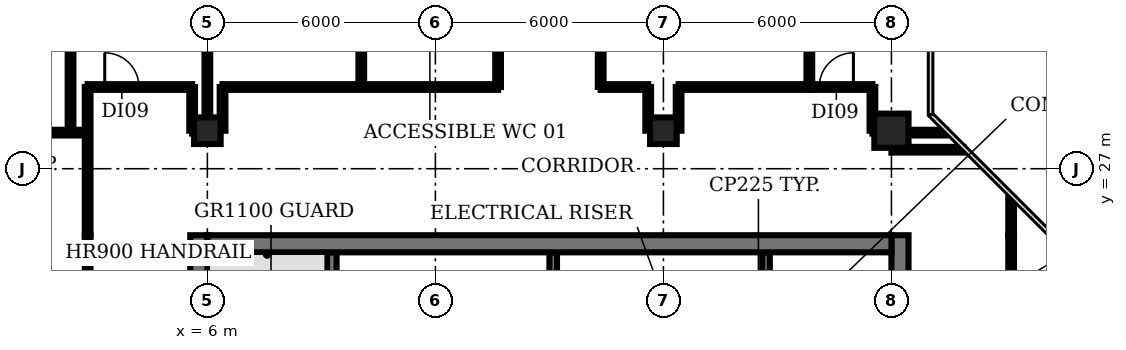
"""IFC4 building model, lengths in metres.
Left out: names, types, materials, properties, quantities, classifications, styles, units other than length and angle.
Written with IfcOpenShell. Run it as: python <this file> out.ifc"""

import sys

from ifc_helpers import new_model, si_unit, direction, frame, frame_2d, origin, origin_2d, place, context, subcontext, project, spatial, rectangle, circle, extrude, element, fill, save


model = new_model("IFC4")
c1 = context("Model", 3, precision=1e-05, world=origin(), true_north=direction((0.0, 1.0)))
c2 = subcontext(c1, "Body", "Model", "MODEL_VIEW")
j1 = project(units=[si_unit("LENGTHUNIT", "METRE"), si_unit("PLANEANGLEUNIT", "RADIAN")], contexts=[c1])
p1 = place(None, origin())
s1 = spatial("IfcSite", under=j1, at=p1, CompositionType="ELEMENT")
p2 = place(p1, origin())
s2 = spatial("IfcBuilding", under=s1, at=p2, CompositionType="ELEMENT")
p3 = place(p2, frame((0.0, 0.0, 243.2)))
s3 = spatial("IfcBuildingStorey", under=s2, at=p3, CompositionType="ELEMENT", Elevation=243.2)
for number, where, z_axis, x_axis in (
    (1, (6.0, 28.0, 0.0), (0.0, 0.0, 1.0), (1.0, 0.0, 0.0)),
    (2, (18.0, 28.0, 0.0), (0.0, 0.0, 1.0), (1.0, 0.0, 0.0)),
):
    element("IfcColumn", number, at=place(p3, frame(where, z_axis=z_axis, x_axis=x_axis)), inside=s3, PredefinedType="COLUMN", context=c2, shape_type="SweptSolid", body=[
        extrude(rectangle(XDim=0.7, YDim=0.7, at=origin_2d()), origin(), (0.0, 0.0, 1.0), 3.85),
    ])
p4 = place(p3, frame((24.0, 28.0, 0.0), z_axis=(0.0, 0.0, 1.0), x_axis=(1.0, 0.0, 0.0)))
e3 = element("IfcColumn", 3, at=p4, inside=s3, PredefinedType="COLUMN", context=c2, shape_type="SweptSolid", body=[
    extrude(circle(Radius=0.45, at=origin_2d()), origin(), (0.0, 0.0, 1.0), 3.85),
])
p5 = place(p3, frame((9.275, 18.375, 0.0), z_axis=(0.0, 0.0, 1.0), x_axis=(0.0, 1.0, 0.0)))
e4 = element("IfcWall", 4, at=p5, inside=s3, PredefinedType="SHEAR", context=c2, shape_type="SweptSolid", body=[
    extrude(rectangle(XDim=6.425, YDim=0.25, at=frame_2d((3.212, 0.0))), origin(), (0.0, 0.0, 1.0), 3.85),
])
for number, where, z_axis, x_axis in (
    (5, (15.1, 22.9, 0.0), (0.0, 0.0, 1.0), (0.0, 1.0, 0.0)),
    (6, (20.7, 22.9, 0.0), (0.0, 0.0, 1.0), (0.0, 1.0, 0.0)),
):
    element("IfcWall", number, at=place(p3, frame(where, z_axis=z_axis, x_axis=x_axis)), inside=s3, PredefinedType="SHEAR", context=c2, shape_type="SweptSolid", body=[
        extrude(rectangle(XDim=1.9, YDim=0.2, at=frame_2d((0.95, 0.0))), origin(), (0.0, 0.0, 1.0), 3.85),
    ])
p6 = place(p3, frame((5.775, 4.42, 0.0), z_axis=(0.0, 0.0, 1.0), x_axis=(0.0, 1.0, 0.0)))
e7 = element("IfcWall", 7, at=p6, inside=s3, PredefinedType="SHEAR", context=c2, shape_type="SweptSolid", body=[
    extrude(rectangle(XDim=20.83, YDim=0.45, at=frame_2d((10.415, 0.0))), origin(), (0.0, 0.0, 1.0), 3.85),
])
p7 = place(p6, frame((1.23, 0.0, 0.0)))
e8 = element("IfcOpeningElement", 8, at=p7, cuts=e7, PredefinedType="OPENING", context=c2, shape_type="SweptSolid", body=[
    extrude(rectangle(XDim=1.5, YDim=2.1, at=frame_2d((0.75, 1.05))), frame((0.0, 0.235, 0.0), z_axis=(0.0, -1.0, 0.0), x_axis=(1.0, 0.0, 0.0)), (0.0, 0.0, 1.0), 0.47),
])
p8 = place(p6, frame((7.68, 0.0, 0.0)))
e9 = element("IfcOpeningElement", 9, at=p8, cuts=e7, PredefinedType="OPENING", context=c2, shape_type="SweptSolid", body=[
    extrude(rectangle(XDim=1.2, YDim=2.1, at=frame_2d((0.6, 1.05))), frame((0.0, 0.235, 0.0), z_axis=(0.0, -1.0, 0.0), x_axis=(1.0, 0.0, 0.0)), (0.0, 0.0, 1.0), 0.47),
])
p9 = place(p6, frame((14.23, 0.0, 0.0)))
e10 = element("IfcOpeningElement", 10, at=p9, cuts=e7, PredefinedType="OPENING", context=c2, shape_type="SweptSolid", body=[
    extrude(rectangle(XDim=1.2, YDim=2.1, at=frame_2d((0.6, 1.05))), frame((0.0, 0.235, 0.0), z_axis=(0.0, -1.0, 0.0), x_axis=(1.0, 0.0, 0.0)), (0.0, 0.0, 1.0), 0.47),
])
p10 = place(p3, frame((24.225, 25.25, 0.0), z_axis=(0.0, 0.0, 1.0), x_axis=(0.0, -1.0, 0.0)))
e11 = element("IfcWall", 11, at=p10, inside=s3, PredefinedType="SHEAR", context=c2, shape_type="SweptSolid", body=[
    extrude(rectangle(XDim=20.83, YDim=0.45, at=frame_2d((10.415, 0.0))), origin(), (0.0, 0.0, 1.0), 3.85),
])
p11 = place(p10, frame((18.1, 0.0, 0.0)))
e12 = element("IfcOpeningElement", 12, at=p11, cuts=e11, PredefinedType="OPENING", context=c2, shape_type="SweptSolid", body=[
    extrude(rectangle(XDim=1.5, YDim=2.1, at=frame_2d((0.75, 1.05))), frame((0.0, 0.235, 0.0), z_axis=(0.0, -1.0, 0.0), x_axis=(1.0, 0.0, 0.0)), (0.0, 0.0, 1.0), 0.47),
])
p12 = place(p10, frame((12.0, 0.0, 0.0)))
e13 = element("IfcOpeningElement", 13, at=p12, cuts=e11, PredefinedType="OPENING", context=c2, shape_type="SweptSolid", body=[
    extrude(rectangle(XDim=0.9, YDim=2.1, at=frame_2d((0.45, 1.05))), frame((0.0, 0.235, 0.0), z_axis=(0.0, -1.0, 0.0), x_axis=(1.0, 0.0, 0.0)), (0.0, 0.0, 1.0), 0.47),
])
p13 = place(p10, frame((6.0, 0.0, 0.0)))
e14 = element("IfcOpeningElement", 14, at=p13, cuts=e11, PredefinedType="OPENING", context=c2, shape_type="SweptSolid", body=[
    extrude(rectangle(XDim=2.0, YDim=2.1, at=frame_2d((1.0, 1.05))), frame((0.0, 0.235, 0.0), z_axis=(0.0, -1.0, 0.0), x_axis=(1.0, 0.0, 0.0)), (0.0, 0.0, 1.0), 0.47),
])
p14 = place(p3, frame((6.0, 25.025, 0.0), z_axis=(0.0, 0.0, 1.0), x_axis=(1.0, 0.0, 0.0)))
e15 = element("IfcWall", 15, at=p14, inside=s3, PredefinedType="SHEAR", context=c2, shape_type="SweptSolid", body=[
    extrude(rectangle(XDim=18.0, YDim=0.45, at=frame_2d((9.0, 0.0))), origin(), (0.0, 0.0, 1.0), 3.85),
])
p15 = place(p3, frame((-1.52, 27.95, 0.0), z_axis=(0.0, 0.0, 1.0), x_axis=(1.0, 0.0, 0.0)))
e16 = element("IfcWall", 16, at=p15, inside=s3, PredefinedType="PARTITIONING", context=c2, shape_type="SweptSolid", body=[
    extrude(rectangle(XDim=4.37, YDim=0.15, at=frame_2d((2.185, 0.0))), origin(), (0.0, 0.0, 1.0), 2.88),
])
p16 = place(p3, frame((2.4, 27.95, 0.0), z_axis=(0.0, 0.0, 1.0), x_axis=(0.0, 1.0, 0.0)))
e17 = element("IfcWall", 17, at=p16, inside=s3, PredefinedType="PARTITIONING", context=c2, shape_type="SweptSolid", body=[
    extrude(rectangle(XDim=6.0, YDim=0.15, at=frame_2d((3.0, 0.0))), origin(), (0.0, 0.0, 1.0), 2.88),
])
p17 = place(p3, frame((2.85, 4.41, 0.0), z_axis=(0.0, 0.0, 1.0), x_axis=(0.0, 1.0, 0.0)))
e18 = element("IfcWall", 18, at=p17, inside=s3, PredefinedType="PARTITIONING", context=c2, shape_type="SweptSolid", body=[
    extrude(rectangle(XDim=20.84, YDim=0.15, at=frame_2d((10.42, 0.0))), origin(), (0.0, 0.0, 1.0), 2.88),
])
p18 = place(p17, frame((9.84, 0.0, 0.0)))
e19 = element("IfcOpeningElement", 19, at=p18, cuts=e18, PredefinedType="OPENING", context=c2, shape_type="SweptSolid", body=[
    extrude(rectangle(XDim=1.2, YDim=2.1, at=frame_2d((0.6, 1.05))), frame((0.0, 0.085, 0.0), z_axis=(0.0, -1.0, 0.0), x_axis=(1.0, 0.0, 0.0)), (0.0, 0.0, 1.0), 0.17),
])
p19 = place(p3, frame((2.85, 25.25, 0.0), z_axis=(0.0, 0.0, 1.0), x_axis=(0.0, 1.0, 0.0)))
e20 = element("IfcWall", 20, at=p19, inside=s3, PredefinedType="PARTITIONING", context=c2, shape_type="SweptSolid", body=[
    extrude(rectangle(XDim=3.9, YDim=0.15, at=frame_2d((1.95, 0.0))), origin(), (0.0, 0.0, 1.0), 2.88),
])
p20 = place(p3, frame((2.85, 29.15, 0.0), z_axis=(0.0, 0.0, 1.0), x_axis=(1.0, 0.0, 0.0)))
e21 = element("IfcWall", 21, at=p20, inside=s3, PredefinedType="PARTITIONING", context=c2, shape_type="SweptSolid", body=[
    extrude(rectangle(XDim=2.75, YDim=0.15, at=frame_2d((1.375, 0.0))), origin(), (0.0, 0.0, 1.0), 2.88),
])
p21 = place(p20, frame((0.45, 0.0, 0.0)))
e22 = element("IfcOpeningElement", 22, at=p21, cuts=e21, PredefinedType="OPENING", context=c2, shape_type="SweptSolid", body=[
    extrude(rectangle(XDim=0.9, YDim=2.1, at=frame_2d((0.45, 1.05))), frame((0.0, 0.085, 0.0), z_axis=(0.0, -1.0, 0.0), x_axis=(1.0, 0.0, 0.0)), (0.0, 0.0, 1.0), 0.17),
])
p22 = place(p3, frame((5.6, 28.0, 0.0), z_axis=(0.0, 0.0, 1.0), x_axis=(0.0, 1.0, 0.0)))
e23 = element("IfcWall", 23, at=p22, inside=s3, PredefinedType="PARTITIONING", context=c2, shape_type="SweptSolid", body=[
    extrude(rectangle(XDim=1.15, YDim=0.15, at=frame_2d((0.575, 0.0))), origin(), (0.0, 0.0, 1.0), 2.88),
])
p23 = place(p3, frame((5.6, 28.0, 0.0), z_axis=(0.0, 0.0, 1.0), x_axis=(1.0, 0.0, 0.0)))
e24 = element("IfcWall", 24, at=p23, inside=s3, PredefinedType="PARTITIONING", context=c2, shape_type="SweptSolid", body=[
    extrude(rectangle(XDim=0.4, YDim=0.15, at=frame_2d((0.2, 0.0))), origin(), (0.0, 0.0, 1.0), 2.88),
])
p24 = place(p3, frame((6.0, 28.0, 0.0), z_axis=(0.0, 0.0, 1.0), x_axis=(0.0, 1.0, 0.0)))
e25 = element("IfcWall", 25, at=p24, inside=s3, PredefinedType="PARTITIONING", context=c2, shape_type="SweptSolid", body=[
    extrude(rectangle(XDim=5.95, YDim=0.15, at=frame_2d((2.975, 0.0))), origin(), (0.0, 0.0, 1.0), 2.88),
])
p25 = place(p3, frame((6.4, 28.0, 0.0), z_axis=(0.0, 0.0, 1.0), x_axis=(0.0, 1.0, 0.0)))
e26 = element("IfcWall", 26, at=p25, inside=s3, PredefinedType="PARTITIONING", context=c2, shape_type="SweptSolid", body=[
    extrude(rectangle(XDim=1.15, YDim=0.15, at=frame_2d((0.575, 0.0))), origin(), (0.0, 0.0, 1.0), 2.88),
])
p26 = place(p3, frame((6.4, 29.15, 0.0), z_axis=(0.0, 0.0, 1.0), x_axis=(1.0, 0.0, 0.0)))
e27 = element("IfcWall", 27, at=p26, inside=s3, PredefinedType="PARTITIONING", context=c2, shape_type="SweptSolid", body=[
    extrude(rectangle(XDim=7.25, YDim=0.15, at=frame_2d((3.625, 0.0))), origin(), (0.0, 0.0, 1.0), 2.88),
])
p27 = place(p3, frame((10.05, 29.15, 0.0), z_axis=(0.0, 0.0, 1.0), x_axis=(0.0, 1.0, 0.0)))
e28 = element("IfcWall", 28, at=p27, inside=s3, PredefinedType="PARTITIONING", context=c2, shape_type="SweptSolid", body=[
    extrude(rectangle(XDim=4.8, YDim=0.15, at=frame_2d((2.4, 0.0))), origin(), (0.0, 0.0, 1.0), 2.88),
])
p28 = place(p3, frame((13.65, 29.15, 0.0), z_axis=(0.0, 0.0, 1.0), x_axis=(0.0, 1.0, 0.0)))
e29 = element("IfcWall", 29, at=p28, inside=s3, PredefinedType="PARTITIONING", context=c2, shape_type="SweptSolid", body=[
    extrude(rectangle(XDim=4.8, YDim=0.15, at=frame_2d((2.4, 0.0))), origin(), (0.0, 0.0, 1.0), 2.88),
])
p29 = place(p28, frame((1.6, 0.0, 0.0)))
e30 = element("IfcOpeningElement", 30, at=p29, cuts=e29, PredefinedType="OPENING", context=c2, shape_type="SweptSolid", body=[
    extrude(rectangle(XDim=0.9, YDim=2.1, at=frame_2d((0.45, 1.05))), frame((0.0, 0.085, 0.0), z_axis=(0.0, -1.0, 0.0), x_axis=(1.0, 0.0, 0.0)), (0.0, 0.0, 1.0), 0.17),
])
p30 = place(p3, frame((16.35, 29.15, 0.0), z_axis=(0.0, 0.0, 1.0), x_axis=(0.0, 1.0, 0.0)))
e31 = element("IfcWall", 31, at=p30, inside=s3, PredefinedType="PARTITIONING", context=c2, shape_type="SweptSolid", body=[
    extrude(rectangle(XDim=4.8, YDim=0.15, at=frame_2d((2.4, 0.0))), origin(), (0.0, 0.0, 1.0), 2.88),
])
p31 = place(p3, frame((16.35, 29.15, 0.0), z_axis=(0.0, 0.0, 1.0), x_axis=(1.0, 0.0, 0.0)))
e32 = element("IfcWall", 32, at=p31, inside=s3, PredefinedType="PARTITIONING", context=c2, shape_type="SweptSolid", body=[
    extrude(rectangle(XDim=1.25, YDim=0.15, at=frame_2d((0.625, 0.0))), origin(), (0.0, 0.0, 1.0), 2.88),
])
for number, where, z_axis, x_axis in (
    (33, (17.6, 28.0, 0.0), (0.0, 0.0, 1.0), (0.0, 1.0, 0.0)),
    (34, (18.4, 28.0, 0.0), (0.0, 0.0, 1.0), (0.0, 1.0, 0.0)),
):
    element("IfcWall", number, at=place(p3, frame(where, z_axis=z_axis, x_axis=x_axis)), inside=s3, PredefinedType="PARTITIONING", context=c2, shape_type="SweptSolid", body=[
        extrude(rectangle(XDim=1.15, YDim=0.15, at=frame_2d((0.575, 0.0))), origin(), (0.0, 0.0, 1.0), 2.88),
    ])
p32 = place(p3, frame((18.4, 29.15, 0.0), z_axis=(0.0, 0.0, 1.0), x_axis=(1.0, 0.0, 0.0)))
e35 = element("IfcWall", 35, at=p32, inside=s3, PredefinedType="PARTITIONING", context=c2, shape_type="SweptSolid", body=[
    extrude(rectangle(XDim=3.44, YDim=0.15, at=frame_2d((1.72, 0.0))), origin(), (0.0, 0.0, 1.0), 2.88),
])
p33 = place(p3, frame((21.84, 29.15, 0.0), z_axis=(0.0, 0.0, 1.0), x_axis=(0.0, 1.0, 0.0)))
e36 = element("IfcWall", 36, at=p33, inside=s3, PredefinedType="PARTITIONING", context=c2, shape_type="SweptSolid", body=[
    extrude(rectangle(XDim=4.8, YDim=0.15, at=frame_2d((2.4, 0.0))), origin(), (0.0, 0.0, 1.0), 2.88),
])
p34 = place(p3, frame((21.84, 29.15, 0.0), z_axis=(0.0, 0.0, 1.0), x_axis=(1.0, 0.0, 0.0)))
e37 = element("IfcWall", 37, at=p34, inside=s3, PredefinedType="PARTITIONING", context=c2, shape_type="SweptSolid", body=[
    extrude(rectangle(XDim=1.66, YDim=0.15, at=frame_2d((0.83, 0.0))), origin(), (0.0, 0.0, 1.0), 2.88),
])
p35 = place(p34, frame((0.26, 0.0, 0.0)))
e38 = element("IfcOpeningElement", 38, at=p35, cuts=e37, PredefinedType="OPENING", context=c2, shape_type="SweptSolid", body=[
    extrude(rectangle(XDim=0.9, YDim=2.1, at=frame_2d((0.45, 1.05))), frame((0.0, 0.085, 0.0), z_axis=(0.0, -1.0, 0.0), x_axis=(1.0, 0.0, 0.0)), (0.0, 0.0, 1.0), 0.17),
])
p36 = place(p3, frame((23.5, 28.0, 0.0), z_axis=(0.0, 0.0, 1.0), x_axis=(0.0, 1.0, 0.0)))
e39 = element("IfcWall", 39, at=p36, inside=s3, PredefinedType="PARTITIONING", context=c2, shape_type="SweptSolid", body=[
    extrude(rectangle(XDim=1.15, YDim=0.15, at=frame_2d((0.575, 0.0))), origin(), (0.0, 0.0, 1.0), 2.88),
])
p37 = place(p3, frame((23.5, 28.0, 0.0), z_axis=(0.0, 0.0, 1.0), x_axis=(1.0, 0.0, 0.0)))
e40 = element("IfcWall", 40, at=p37, inside=s3, PredefinedType="PARTITIONING", context=c2, shape_type="SweptSolid", body=[
    extrude(rectangle(XDim=0.5, YDim=0.15, at=frame_2d((0.25, 0.0))), origin(), (0.0, 0.0, 1.0), 2.88),
])
p38 = place(p3, frame((24.0, 27.5, 0.0), z_axis=(0.0, 0.0, 1.0), x_axis=(1.0, 0.0, 0.0)))
e41 = element("IfcWall", 41, at=p38, inside=s3, PredefinedType="PARTITIONING", context=c2, shape_type="SweptSolid", body=[
    extrude(rectangle(XDim=1.89, YDim=0.15, at=frame_2d((0.945, 0.0))), origin(), (0.0, 0.0, 1.0), 2.88),
])
p39 = place(p3, frame((24.0, 27.95, 0.0), z_axis=(0.0, 0.0, 1.0), x_axis=(1.0, 0.0, 0.0)))
e42 = element("IfcWall", 42, at=p39, inside=s3, PredefinedType="PARTITIONING", context=c2, shape_type="SweptSolid", body=[
    extrude(rectangle(XDim=1.44, YDim=0.15, at=frame_2d((0.72, 0.0))), origin(), (0.0, 0.0, 1.0), 2.88),
])
p40 = place(p3, frame((27.15, 20.4, 0.0), z_axis=(0.0, 0.0, 1.0), x_axis=(0.0, 1.0, 0.0)))
e43 = element("IfcWall", 43, at=p40, inside=s3, PredefinedType="PARTITIONING", context=c2, shape_type="SweptSolid", body=[
    extrude(rectangle(XDim=4.85, YDim=0.15, at=frame_2d((2.425, 0.0))), origin(), (0.0, 0.0, 1.0), 2.88),
])
p41 = place(p40, frame((1.7, 0.0, 0.0)))
e44 = element("IfcOpeningElement", 44, at=p41, cuts=e43, PredefinedType="OPENING", context=c2, shape_type="SweptSolid", body=[
    extrude(rectangle(XDim=1.8, YDim=2.1, at=frame_2d((0.9, 1.05))), frame((0.0, 0.085, 0.0), z_axis=(0.0, -1.0, 0.0), x_axis=(1.0, 0.0, 0.0)), (0.0, 0.0, 1.0), 0.17),
])
p42 = place(p3, frame((27.15, 25.25, 0.0), z_axis=(0.0, 0.0, 1.0), x_axis=(0.0, 1.0, 0.0)))
e45 = element("IfcWall", 45, at=p42, inside=s3, PredefinedType="PARTITIONING", context=c2, shape_type="SweptSolid", body=[
    extrude(rectangle(XDim=0.98, YDim=0.15, at=frame_2d((0.49, 0.0))), origin(), (0.0, 0.0, 1.0), 2.88),
])
p43 = place(p21, origin())
e46 = element("IfcDoor", 46, at=p43, inside=s3, OperationType="SINGLE_SWING_LEFT", PredefinedType="DOOR", context=c2, shape_type="SweptSolid", body=[
    extrude(rectangle(XDim=0.9, YDim=2.1, at=frame_2d((0.45, 1.05))), frame((0.0, 0.025, 0.0), z_axis=(0.0, -1.0, 0.0), x_axis=(1.0, 0.0, 0.0)), (0.0, 0.0, 1.0), 0.05),
])
fill(e22, e46)
p44 = place(p35, origin())
e47 = element("IfcDoor", 47, at=p44, inside=s3, OperationType="SINGLE_SWING_RIGHT", PredefinedType="DOOR", context=c2, shape_type="SweptSolid", body=[
    extrude(rectangle(XDim=0.9, YDim=2.1, at=frame_2d((0.45, 1.05))), frame((0.0, 0.025, 0.0), z_axis=(0.0, -1.0, 0.0), x_axis=(1.0, 0.0, 0.0)), (0.0, 0.0, 1.0), 0.05),
])
fill(e38, e47)
save(model, sys.argv[1])
